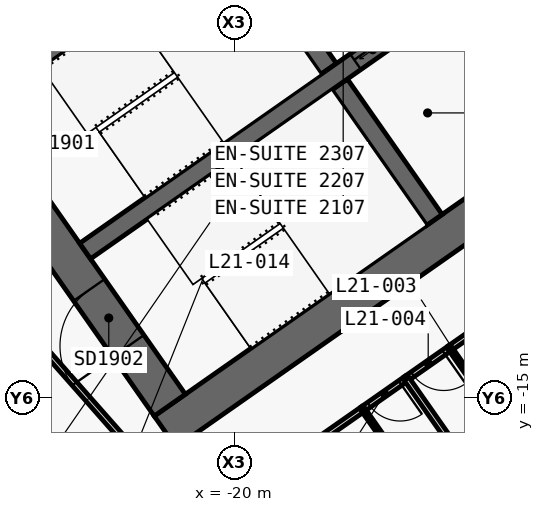
"""IFC4 building model, lengths in metres.
Left out: names, types, materials, properties, quantities, classifications, styles, units other than length and angle.
Written with IfcOpenShell. Run it as: python <this file> out.ifc"""

import sys

from ifc_helpers import new_model, si_unit, direction, frame, frame_2d, origin, place, context, subcontext, project, spatial, polyline, rectangle, outline, extrude, element, fill, save


model = new_model("IFC4")
c1 = context("Model", 3, precision=1e-05, world=origin(), true_north=direction((0.0, 1.0)))
c2 = subcontext(c1, "Body", "Model", "MODEL_VIEW")
j1 = project(units=[si_unit("LENGTHUNIT", "METRE"), si_unit("PLANEANGLEUNIT", "RADIAN")], contexts=[c1])
p1 = place(None, origin())
s1 = spatial("IfcSite", under=j1, at=p1, CompositionType="ELEMENT")
p2 = place(p1, origin())
s2 = spatial("IfcBuilding", under=s1, at=p2, CompositionType="ELEMENT")
p3 = place(p2, frame((0.0, 0.0, 101.3)))
s3 = spatial("IfcBuildingStorey", under=s2, at=p3, CompositionType="ELEMENT", Elevation=101.3)
p4 = place(p3, frame((0.037, 11.867, 0.0), z_axis=(0.0, 0.0, 1.0), x_axis=(-0.819155306259, -0.573571777746, 0.0)))
e1 = element("IfcWall", 1, at=p4, inside=s3, PredefinedType="SHEAR", context=c2, shape_type="SweptSolid", body=[
    extrude(outline(polyline([(33.837, 0.5), (0.7, 0.5), (0.0, -0.5), (33.837, -0.5), (33.837, 0.5)])), origin(), (0.0, 0.0, 1.0), 3.6),
])
p5 = place(p3, frame((0.037, -0.585, 0.0), z_axis=(0.0, 0.0, 1.0), x_axis=(-0.819157152511, -0.573569140985, 0.0)))
e2 = element("IfcWall", 2, at=p5, inside=s3, PredefinedType="SHEAR", context=c2, shape_type="SweptSolid", body=[
    extrude(outline(polyline([(26.695, 0.5), (0.7, 0.5), (0.0, -0.5), (26.695, -0.5), (26.695, 0.5)])), origin(), (0.0, 0.0, 1.0), 3.6),
])
p6 = place(p5, frame((2.995, 0.0, 0.0)))
e3 = element("IfcOpeningElement", 3, at=p6, cuts=e2, PredefinedType="OPENING", context=c2, shape_type="SweptSolid", body=[
    extrude(rectangle(XDim=2.4, YDim=2.1, at=frame_2d((1.2, 1.05))), frame((0.0, 0.51, 0.0), z_axis=(0.0, -1.0, 0.0), x_axis=(1.0, 0.0, 0.0)), (0.0, 0.0, 1.0), 1.02),
])
p7 = place(p5, frame((11.995, 0.0, 0.0)))
e4 = element("IfcOpeningElement", 4, at=p7, cuts=e2, PredefinedType="OPENING", context=c2, shape_type="SweptSolid", body=[
    extrude(rectangle(XDim=2.4, YDim=2.1, at=frame_2d((1.2, 1.05))), frame((0.0, 0.51, 0.0), z_axis=(0.0, -1.0, 0.0), x_axis=(1.0, 0.0, 0.0)), (0.0, 0.0, 1.0), 1.02),
])
p8 = place(p3, frame((-21.708, -15.2, 0.0), z_axis=(0.0, 0.0, 1.0), x_axis=(-0.573576324356, 0.819152122709, 0.0)))
e5 = element("IfcWall", 5, at=p8, inside=s3, PredefinedType="SHEAR", context=c2, shape_type="SweptSolid", body=[
    extrude(outline(polyline([(0.0, 0.5), (0.0, -0.5), (9.2, -0.5), (9.2, 0.5), (0.0, 0.5)])), origin(), (0.0, 0.0, 1.0), 3.6),
])
p9 = place(p8, frame((6.1, 0.0, 0.0)))
e6 = element("IfcOpeningElement", 6, at=p9, cuts=e5, PredefinedType="OPENING", context=c2, shape_type="SweptSolid", body=[
    extrude(rectangle(XDim=1.8, YDim=2.1, at=frame_2d((0.9, 1.05))), frame((0.0, 0.51, 0.0), z_axis=(0.0, -1.0, 0.0), x_axis=(1.0, 0.0, 0.0)), (0.0, 0.0, 1.0), 1.02),
])
p10 = place(p8, frame((1.9, 0.0, 0.0)))
e7 = element("IfcOpeningElement", 7, at=p10, cuts=e5, PredefinedType="OPENING", context=c2, shape_type="SweptSolid", body=[
    extrude(rectangle(XDim=1.8, YDim=2.1, at=frame_2d((0.9, 1.05))), frame((0.0, 0.51, 0.0), z_axis=(0.0, -1.0, 0.0), x_axis=(1.0, 0.0, 0.0)), (0.0, 0.0, 1.0), 1.02),
])
p11 = place(p3, frame((-14.745, -10.324, 0.0), z_axis=(0.0, 0.0, 1.0), x_axis=(-0.57356780395, 0.819158088694, 0.0)))
e8 = element("IfcWall", 8, at=p11, inside=s3, PredefinedType="SHEAR", context=c2, shape_type="SweptSolid", body=[
    extrude(outline(polyline([(4.35, 0.25), (0.0, 0.25), (0.0, -0.25), (4.35, -0.25), (4.35, 0.25)])), origin(), (0.0, 0.0, 1.0), 3.6),
])
p12 = place(p3, frame((-17.527, -6.352, 0.0), z_axis=(0.0, 0.0, 1.0), x_axis=(-0.573530143085, 0.819184457233, 0.0)))
e9 = element("IfcWall", 9, at=p12, inside=s3, PredefinedType="SHEAR", context=c2, shape_type="SweptSolid", body=[
    extrude(outline(polyline([(4.35, -0.25), (4.35, 0.25), (0.0, 0.25), (0.0, -0.25), (4.35, -0.25)])), origin(), (0.0, 0.0, 1.0), 3.6),
])
p13 = place(p3, frame((-2.638, 3.768, 0.0), z_axis=(0.0, 0.0, 1.0), x_axis=(-0.819148977158, -0.573580816643, 0.0)))
e10 = element("IfcWall", 10, at=p13, inside=s3, PredefinedType="SHEAR", context=c2, shape_type="SweptSolid", body=[
    extrude(outline(polyline([(26.0, 0.25), (0.0, 0.25), (0.0, -0.25), (26.0, -0.25), (26.0, 0.25)])), origin(), (0.0, 0.0, 1.0), 3.6),
])
p14 = place(p13, frame((1.169, 0.0, 0.0)))
e11 = element("IfcOpeningElement", 11, at=p14, cuts=e10, PredefinedType="OPENING", context=c2, shape_type="SweptSolid", body=[
    extrude(rectangle(XDim=1.1, YDim=2.1, at=frame_2d((0.55, 1.05))), frame((0.0, 0.26, 0.0), z_axis=(0.0, -1.0, 0.0), x_axis=(1.0, 0.0, 0.0)), (0.0, 0.0, 1.0), 0.52),
])
p15 = place(p13, frame((3.206, 0.0, 0.0)))
e12 = element("IfcOpeningElement", 12, at=p15, cuts=e10, PredefinedType="OPENING", context=c2, shape_type="SweptSolid", body=[
    extrude(rectangle(XDim=1.1, YDim=2.1, at=frame_2d((0.55, 1.05))), frame((0.0, 0.26, 0.0), z_axis=(0.0, -1.0, 0.0), x_axis=(1.0, 0.0, 0.0)), (0.0, 0.0, 1.0), 0.52),
])
p16 = place(p13, frame((5.244, 0.0, 0.0)))
e13 = element("IfcOpeningElement", 13, at=p16, cuts=e10, PredefinedType="OPENING", context=c2, shape_type="SweptSolid", body=[
    extrude(rectangle(XDim=1.1, YDim=2.1, at=frame_2d((0.55, 1.05))), frame((0.0, 0.26, 0.0), z_axis=(0.0, -1.0, 0.0), x_axis=(1.0, 0.0, 0.0)), (0.0, 0.0, 1.0), 0.52),
])
p17 = place(p13, frame((7.281, 0.0, 0.0)))
e14 = element("IfcOpeningElement", 14, at=p17, cuts=e10, PredefinedType="OPENING", context=c2, shape_type="SweptSolid", body=[
    extrude(rectangle(XDim=1.1, YDim=2.1, at=frame_2d((0.55, 1.05))), frame((0.0, 0.26, 0.0), z_axis=(0.0, -1.0, 0.0), x_axis=(1.0, 0.0, 0.0)), (0.0, 0.0, 1.0), 0.52),
])
p18 = place(p13, frame((9.688, 0.0, 0.0)))
e15 = element("IfcOpeningElement", 15, at=p18, cuts=e10, PredefinedType="OPENING", context=c2, shape_type="SweptSolid", body=[
    extrude(rectangle(XDim=1.1, YDim=2.1, at=frame_2d((0.55, 1.05))), frame((0.0, 0.26, 0.0), z_axis=(0.0, -1.0, 0.0), x_axis=(1.0, 0.0, 0.0)), (0.0, 0.0, 1.0), 0.52),
])
p19 = place(p13, frame((11.863, 0.0, 0.0)))
e16 = element("IfcOpeningElement", 16, at=p19, cuts=e10, PredefinedType="OPENING", context=c2, shape_type="SweptSolid", body=[
    extrude(rectangle(XDim=1.1, YDim=2.1, at=frame_2d((0.55, 1.05))), frame((0.0, 0.26, 0.0), z_axis=(0.0, -1.0, 0.0), x_axis=(1.0, 0.0, 0.0)), (0.0, 0.0, 1.0), 0.52),
])
p20 = place(p13, frame((14.038, 0.0, 0.0)))
e17 = element("IfcOpeningElement", 17, at=p20, cuts=e10, PredefinedType="OPENING", context=c2, shape_type="SweptSolid", body=[
    extrude(rectangle(XDim=1.1, YDim=2.1, at=frame_2d((0.55, 1.05))), frame((0.0, 0.26, 0.0), z_axis=(0.0, -1.0, 0.0), x_axis=(1.0, 0.0, 0.0)), (0.0, 0.0, 1.0), 0.52),
])
p21 = place(p13, frame((16.212, 0.0, 0.0)))
e18 = element("IfcOpeningElement", 18, at=p21, cuts=e10, PredefinedType="OPENING", context=c2, shape_type="SweptSolid", body=[
    extrude(rectangle(XDim=1.1, YDim=2.1, at=frame_2d((0.55, 1.05))), frame((0.0, 0.26, 0.0), z_axis=(0.0, -1.0, 0.0), x_axis=(1.0, 0.0, 0.0)), (0.0, 0.0, 1.0), 0.52),
])
p22 = place(p3, frame((-14.334, -13.699, 0.0), z_axis=(0.0, 0.0, 1.0), x_axis=(-0.819199220913, -0.573509055252, 0.0)))
e19 = element("IfcWall", 19, at=p22, inside=s3, PredefinedType="PARTITIONING", context=c2, shape_type="SweptSolid", body=[
    extrude(rectangle(XDim=1.403, YDim=0.15, at=frame_2d((0.702, 0.0))), origin(), (0.0, 0.0, 1.0), 3.32),
])
p23 = place(p22, frame((0.201, 0.0, 0.0)))
e20 = element("IfcOpeningElement", 20, at=p23, cuts=e19, PredefinedType="OPENING", context=c2, shape_type="SweptSolid", body=[
    extrude(rectangle(XDim=1.0, YDim=2.1, at=frame_2d((0.5, 1.05))), frame((0.0, 0.085, 0.0), z_axis=(0.0, -1.0, 0.0), x_axis=(1.0, 0.0, 0.0)), (0.0, 0.0, 1.0), 0.17),
])
p24 = place(p3, frame((-13.022, -12.781, 0.0), z_axis=(0.0, 0.0, 1.0), x_axis=(-0.819138938282, -0.573595153214, 0.0)))
e21 = element("IfcWall", 21, at=p24, inside=s3, PredefinedType="PARTITIONING", context=c2, shape_type="SweptSolid", body=[
    extrude(rectangle(XDim=1.604, YDim=0.15, at=frame_2d((0.802, 0.0))), origin(), (0.0, 0.0, 1.0), 2.6),
])
p25 = place(p3, frame((-15.48, -14.501, 0.0), z_axis=(0.0, 0.0, 1.0), x_axis=(-0.819199220913, -0.573509055252, 0.0)))
e22 = element("IfcWall", 22, at=p25, inside=s3, PredefinedType="PARTITIONING", context=c2, shape_type="SweptSolid", body=[
    extrude(rectangle(XDim=1.403, YDim=0.15, at=frame_2d((0.702, 0.0))), origin(), (0.0, 0.0, 1.0), 3.32),
])
p26 = place(p25, frame((0.202, 0.0, 0.0)))
e23 = element("IfcOpeningElement", 23, at=p26, cuts=e22, PredefinedType="OPENING", context=c2, shape_type="SweptSolid", body=[
    extrude(rectangle(XDim=1.0, YDim=2.1, at=frame_2d((0.5, 1.05))), frame((0.0, 0.085, 0.0), z_axis=(0.0, -1.0, 0.0), x_axis=(1.0, 0.0, 0.0)), (0.0, 0.0, 1.0), 0.17),
])
p27 = place(p3, frame((-16.627, -15.304, 0.0), z_axis=(0.0, 0.0, 1.0), x_axis=(-0.819189013667, -0.573523634986, 0.0)))
e24 = element("IfcWall", 24, at=p27, inside=s3, PredefinedType="PARTITIONING", context=c2, shape_type="SweptSolid", body=[
    extrude(rectangle(XDim=1.604, YDim=0.15, at=frame_2d((0.802, 0.0))), origin(), (0.0, 0.0, 1.0), 3.32),
])
p28 = place(p3, frame((-22.284, -16.827, 0.0), z_axis=(0.0, 0.0, 1.0), x_axis=(-0.661545117561, 0.749905365651, 0.0)))
e25 = element("IfcWall", 25, at=p28, inside=s3, PredefinedType="PARTITIONING", context=c2, shape_type="SweptSolid", body=[
    extrude(rectangle(XDim=6.543, YDim=0.15, at=frame_2d((3.271, 0.0))), origin(), (0.0, 0.0, 1.0), 2.6),
])
p29 = place(p3, frame((-14.335, -13.7, 0.0), z_axis=(0.0, 0.0, 1.0), x_axis=(0.573582085028, -0.819148089014, 0.0)))
e26 = element("IfcWall", 26, at=p29, inside=s3, PredefinedType="PARTITIONING", context=c2, shape_type="SweptSolid", body=[
    extrude(rectangle(XDim=2.6, YDim=0.12, at=frame_2d((1.3, 0.0))), origin(), (0.0, 0.0, 1.0), 3.32),
])
p30 = place(p29, frame((0.875, 0.0, 0.0)))
e27 = element("IfcOpeningElement", 27, at=p30, cuts=e26, PredefinedType="OPENING", context=c2, shape_type="SweptSolid", body=[
    extrude(rectangle(XDim=0.85, YDim=2.05, at=frame_2d((0.425, 1.025))), frame((0.0, 0.07, 0.0), z_axis=(0.0, -1.0, 0.0), x_axis=(1.0, 0.0, 0.0)), (0.0, 0.0, 1.0), 0.14),
])
p31 = place(p3, frame((-11.294, -20.482, 0.0), z_axis=(0.0, 0.0, 1.0), x_axis=(-0.573572324301, 0.819154923562, 0.0)))
e28 = element("IfcWall", 28, at=p31, inside=s3, PredefinedType="PARTITIONING", context=c2, shape_type="SweptSolid", body=[
    extrude(rectangle(XDim=7.3, YDim=0.15, at=frame_2d((3.65, 0.0))), origin(), (0.0, 0.0, 1.0), 2.5),
])
p32 = place(p3, frame((-15.136, -17.435, 0.0), z_axis=(0.0, 0.0, 1.0), x_axis=(-0.573537965655, 0.819178980414, 0.0)))
e29 = element("IfcWall", 29, at=p32, inside=s3, PredefinedType="PARTITIONING", context=c2, shape_type="SweptSolid", body=[
    extrude(rectangle(XDim=2.6, YDim=0.12, at=frame_2d((1.3, 0.0))), origin(), (0.0, 0.0, 1.0), 3.32),
])
p33 = place(p32, frame((0.875, 0.0, 0.0)))
e30 = element("IfcOpeningElement", 30, at=p33, cuts=e29, PredefinedType="OPENING", context=c2, shape_type="SweptSolid", body=[
    extrude(rectangle(XDim=0.85, YDim=2.05, at=frame_2d((0.425, 1.025))), frame((0.0, 0.07, 0.0), z_axis=(0.0, -1.0, 0.0), x_axis=(1.0, 0.0, 0.0)), (0.0, 0.0, 1.0), 0.14),
])
p34 = place(p21, origin())
e31 = element("IfcDoor", 31, at=p34, inside=s3, OperationType="SLIDING_TO_RIGHT", PredefinedType="DOOR", context=c2, shape_type="SweptSolid", body=[
    extrude(rectangle(XDim=1.1, YDim=2.1, at=frame_2d((0.55, 1.05))), frame((0.0, 0.025, 0.0), z_axis=(0.0, -1.0, 0.0), x_axis=(1.0, 0.0, 0.0)), (0.0, 0.0, 1.0), 0.05),
])
fill(e18, e31)
p35 = place(p10, origin())
e32 = element("IfcDoor", 32, at=p35, inside=s3, OperationType="DOUBLE_DOOR_SINGLE_SWING", PredefinedType="DOOR", context=c2, shape_type="SweptSolid", body=[
    extrude(rectangle(XDim=1.8, YDim=2.1, at=frame_2d((0.9, 1.05))), frame((0.0, 0.025, 0.0), z_axis=(0.0, -1.0, 0.0), x_axis=(1.0, 0.0, 0.0)), (0.0, 0.0, 1.0), 0.05),
])
fill(e7, e32)
p36 = place(p23, origin())
e33 = element("IfcDoor", 33, at=p36, inside=s3, OperationType="SINGLE_SWING_LEFT", PredefinedType="DOOR", context=c2, shape_type="SweptSolid", body=[
    extrude(rectangle(XDim=1.0, YDim=2.1, at=frame_2d((0.5, 1.05))), frame((0.0, 0.025, 0.0), z_axis=(0.0, -1.0, 0.0), x_axis=(1.0, 0.0, 0.0)), (0.0, 0.0, 1.0), 0.05),
])
fill(e20, e33)
p37 = place(p26, origin())
e34 = element("IfcDoor", 34, at=p37, inside=s3, OperationType="SINGLE_SWING_LEFT", PredefinedType="DOOR", context=c2, shape_type="SweptSolid", body=[
    extrude(rectangle(XDim=1.0, YDim=2.1, at=frame_2d((0.5, 1.05))), frame((0.0, 0.025, 0.0), z_axis=(0.0, -1.0, 0.0), x_axis=(1.0, 0.0, 0.0)), (0.0, 0.0, 1.0), 0.05),
])
fill(e23, e34)
save(model, sys.argv[1])
